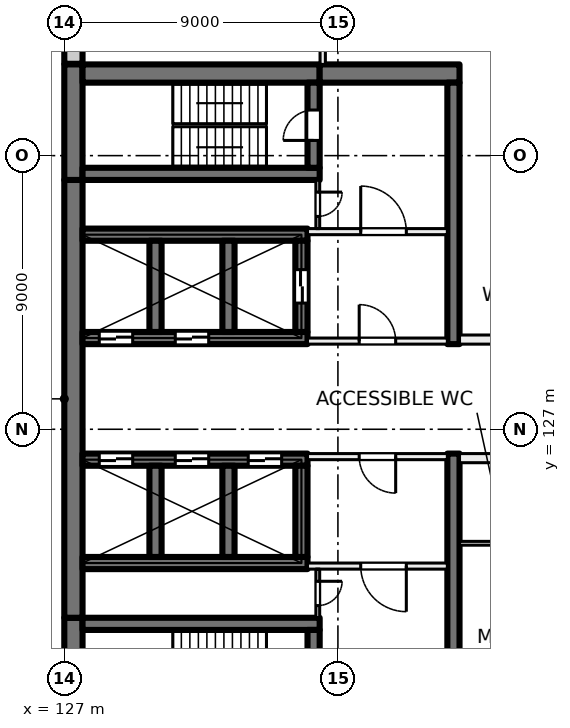
"""IFC4 building model, lengths in metres.
Left out: names, types, materials, properties, quantities, classifications, styles, units other than length and angle.
Written with IfcOpenShell. Run it as: python <this file> out.ifc"""

import sys

from ifc_helpers import new_model, si_unit, direction, frame, frame_2d, origin, place, context, subcontext, project, spatial, rectangle, extrude, element, fill, save


model = new_model("IFC4")
c1 = context("Model", 3, precision=1e-05, world=origin(), true_north=direction((0.0, 1.0)))
c2 = subcontext(c1, "Body", "Model", "MODEL_VIEW")
j1 = project(units=[si_unit("LENGTHUNIT", "METRE"), si_unit("PLANEANGLEUNIT", "RADIAN")], contexts=[c1])
p1 = place(None, origin())
s1 = spatial("IfcSite", under=j1, at=p1, CompositionType="ELEMENT")
p2 = place(p1, origin())
s2 = spatial("IfcBuilding", under=s1, at=p2, CompositionType="ELEMENT")
p3 = place(p2, frame((0.0, 0.0, 51.5)))
s3 = spatial("IfcBuildingStorey", under=s2, at=p3, CompositionType="ELEMENT", Elevation=51.5)
p4 = place(p3, frame((127.3, 117.0, 0.0), z_axis=(0.0, 0.0, 1.0), x_axis=(0.0, 1.0, 0.0)))
e1 = element("IfcWall", 1, at=p4, inside=s3, PredefinedType="SHEAR", context=c2, shape_type="SweptSolid", body=[
    extrude(rectangle(XDim=3.8, YDim=0.6, at=frame_2d((1.9, 0.0))), origin(), (0.0, 0.0, 1.0), 4.0),
])
p5 = place(p3, frame((127.3, 120.8, 0.0), z_axis=(0.0, 0.0, 1.0), x_axis=(0.0, 1.0, 0.0)))
e2 = element("IfcWall", 2, at=p5, inside=s3, PredefinedType="SHEAR", context=c2, shape_type="SweptSolid", body=[
    extrude(rectangle(XDim=14.4, YDim=0.6, at=frame_2d((7.2, 0.0))), origin(), (0.0, 0.0, 1.0), 4.0),
])
p6 = place(p3, frame((127.3, 135.2, 0.0), z_axis=(0.0, 0.0, 1.0), x_axis=(0.0, 1.0, 0.0)))
e3 = element("IfcWall", 3, at=p6, inside=s3, PredefinedType="SHEAR", context=c2, shape_type="SweptSolid", body=[
    extrude(rectangle(XDim=3.8, YDim=0.6, at=frame_2d((1.9, 0.0))), origin(), (0.0, 0.0, 1.0), 4.0),
])
p7 = place(p3, frame((127.6, 138.7, 0.0), z_axis=(0.0, 0.0, 1.0), x_axis=(1.0, 0.0, 0.0)))
e4 = element("IfcWall", 4, at=p7, inside=s3, PredefinedType="SHEAR", context=c2, shape_type="SweptSolid", body=[
    extrude(rectangle(XDim=7.8, YDim=0.6, at=frame_2d((3.9, 0.0))), origin(), (0.0, 0.0, 1.0), 4.0),
])
p8 = place(p3, frame((135.4, 138.7, 0.0), z_axis=(0.0, 0.0, 1.0), x_axis=(1.0, 0.0, 0.0)))
e5 = element("IfcWall", 5, at=p8, inside=s3, PredefinedType="SHEAR", context=c2, shape_type="SweptSolid", body=[
    extrude(rectangle(XDim=4.6, YDim=0.6, at=frame_2d((2.3, 0.0))), origin(), (0.0, 0.0, 1.0), 4.0),
])
p9 = place(p3, frame((127.6, 120.6, 0.0), z_axis=(0.0, 0.0, 1.0), x_axis=(1.0, 0.0, 0.0)))
e6 = element("IfcWall", 6, at=p9, inside=s3, PredefinedType="SHEAR", context=c2, shape_type="SweptSolid", body=[
    extrude(rectangle(XDim=7.8, YDim=0.4, at=frame_2d((3.9, 0.0))), origin(), (0.0, 0.0, 1.0), 4.0),
])
p10 = place(p3, frame((135.2, 117.6, 0.0), z_axis=(0.0, 0.0, 1.0), x_axis=(0.0, 1.0, 0.0)))
e7 = element("IfcWall", 7, at=p10, inside=s3, PredefinedType="SHEAR", context=c2, shape_type="SweptSolid", body=[
    extrude(rectangle(XDim=2.8, YDim=0.4, at=frame_2d((1.4, 0.0))), origin(), (0.0, 0.0, 1.0), 4.0),
])
p11 = place(p10, frame((0.9, 0.0, 0.0)))
e8 = element("IfcOpeningElement", 8, at=p11, cuts=e7, PredefinedType="OPENING", context=c2, shape_type="SweptSolid", body=[
    extrude(rectangle(XDim=1.0, YDim=2.1, at=frame_2d((0.5, 1.05))), frame((0.0, 0.21, 0.0), z_axis=(0.0, -1.0, 0.0), x_axis=(1.0, 0.0, 0.0)), (0.0, 0.0, 1.0), 0.42),
])
p12 = place(p3, frame((127.6, 135.4, 0.0), z_axis=(0.0, 0.0, 1.0), x_axis=(1.0, 0.0, 0.0)))
e9 = element("IfcWall", 9, at=p12, inside=s3, PredefinedType="SHEAR", context=c2, shape_type="SweptSolid", body=[
    extrude(rectangle(XDim=7.8, YDim=0.4, at=frame_2d((3.9, 0.0))), origin(), (0.0, 0.0, 1.0), 4.0),
])
p13 = place(p3, frame((135.2, 135.6, 0.0), z_axis=(0.0, 0.0, 1.0), x_axis=(0.0, 1.0, 0.0)))
e10 = element("IfcWall", 10, at=p13, inside=s3, PredefinedType="SHEAR", context=c2, shape_type="SweptSolid", body=[
    extrude(rectangle(XDim=2.8, YDim=0.4, at=frame_2d((1.4, 0.0))), origin(), (0.0, 0.0, 1.0), 4.0),
])
p14 = place(p13, frame((0.9, 0.0, 0.0)))
e11 = element("IfcOpeningElement", 11, at=p14, cuts=e10, PredefinedType="OPENING", context=c2, shape_type="SweptSolid", body=[
    extrude(rectangle(XDim=1.0, YDim=2.1, at=frame_2d((0.5, 1.05))), frame((0.0, 0.21, 0.0), z_axis=(0.0, -1.0, 0.0), x_axis=(1.0, 0.0, 0.0)), (0.0, 0.0, 1.0), 0.42),
])
p15 = place(p3, frame((127.6, 126.0, 0.0), z_axis=(0.0, 0.0, 1.0), x_axis=(1.0, 0.0, 0.0)))
e12 = element("IfcWall", 12, at=p15, inside=s3, PredefinedType="SHEAR", context=c2, shape_type="SweptSolid", body=[
    extrude(rectangle(XDim=7.4, YDim=0.4, at=frame_2d((3.7, 0.0))), origin(), (0.0, 0.0, 1.0), 4.0),
])
p16 = place(p15, frame((0.55, 0.0, 0.0)))
e13 = element("IfcOpeningElement", 13, at=p16, cuts=e12, PredefinedType="OPENING", context=c2, shape_type="SweptSolid", body=[
    extrude(rectangle(XDim=1.1, YDim=2.1, at=frame_2d((0.55, 1.05))), frame((0.0, 0.21, 0.0), z_axis=(0.0, -1.0, 0.0), x_axis=(1.0, 0.0, 0.0)), (0.0, 0.0, 1.0), 0.42),
])
p17 = place(p15, frame((3.05, 0.0, 0.0)))
e14 = element("IfcOpeningElement", 14, at=p17, cuts=e12, PredefinedType="OPENING", context=c2, shape_type="SweptSolid", body=[
    extrude(rectangle(XDim=1.1, YDim=2.1, at=frame_2d((0.55, 1.05))), frame((0.0, 0.21, 0.0), z_axis=(0.0, -1.0, 0.0), x_axis=(1.0, 0.0, 0.0)), (0.0, 0.0, 1.0), 0.42),
])
p18 = place(p15, frame((5.45, 0.0, 0.0)))
e15 = element("IfcOpeningElement", 15, at=p18, cuts=e12, PredefinedType="OPENING", context=c2, shape_type="SweptSolid", body=[
    extrude(rectangle(XDim=1.1, YDim=2.1, at=frame_2d((0.55, 1.05))), frame((0.0, 0.21, 0.0), z_axis=(0.0, -1.0, 0.0), x_axis=(1.0, 0.0, 0.0)), (0.0, 0.0, 1.0), 0.42),
])
p19 = place(p3, frame((127.6, 122.6, 0.0), z_axis=(0.0, 0.0, 1.0), x_axis=(1.0, 0.0, 0.0)))
e16 = element("IfcWall", 16, at=p19, inside=s3, PredefinedType="SHEAR", context=c2, shape_type="SweptSolid", body=[
    extrude(rectangle(XDim=7.4, YDim=0.4, at=frame_2d((3.7, 0.0))), origin(), (0.0, 0.0, 1.0), 4.0),
])
for number, where, z_axis, x_axis in (
    (17, (130.0, 122.8, 0.0), (0.0, 0.0, 1.0), (0.0, 1.0, 0.0)),
    (18, (132.4, 122.8, 0.0), (0.0, 0.0, 1.0), (0.0, 1.0, 0.0)),
    (19, (134.8, 122.8, 0.0), (0.0, 0.0, 1.0), (0.0, 1.0, 0.0)),
):
    element("IfcWall", number, at=place(p3, frame(where, z_axis=z_axis, x_axis=x_axis)), inside=s3, PredefinedType="SHEAR", context=c2, shape_type="SweptSolid", body=[
        extrude(rectangle(XDim=3.0, YDim=0.4, at=frame_2d((1.5, 0.0))), origin(), (0.0, 0.0, 1.0), 4.0),
    ])
p20 = place(p3, frame((127.6, 130.0, 0.0), z_axis=(0.0, 0.0, 1.0), x_axis=(1.0, 0.0, 0.0)))
e20 = element("IfcWall", 20, at=p20, inside=s3, PredefinedType="SHEAR", context=c2, shape_type="SweptSolid", body=[
    extrude(rectangle(XDim=7.4, YDim=0.4, at=frame_2d((3.7, 0.0))), origin(), (0.0, 0.0, 1.0), 4.0),
])
p21 = place(p20, frame((0.55, 0.0, 0.0)))
e21 = element("IfcOpeningElement", 21, at=p21, cuts=e20, PredefinedType="OPENING", context=c2, shape_type="SweptSolid", body=[
    extrude(rectangle(XDim=1.1, YDim=2.1, at=frame_2d((0.55, 1.05))), frame((0.0, 0.21, 0.0), z_axis=(0.0, -1.0, 0.0), x_axis=(1.0, 0.0, 0.0)), (0.0, 0.0, 1.0), 0.42),
])
p22 = place(p20, frame((3.05, 0.0, 0.0)))
e22 = element("IfcOpeningElement", 22, at=p22, cuts=e20, PredefinedType="OPENING", context=c2, shape_type="SweptSolid", body=[
    extrude(rectangle(XDim=1.1, YDim=2.1, at=frame_2d((0.55, 1.05))), frame((0.0, 0.21, 0.0), z_axis=(0.0, -1.0, 0.0), x_axis=(1.0, 0.0, 0.0)), (0.0, 0.0, 1.0), 0.42),
])
p23 = place(p3, frame((127.6, 133.4, 0.0), z_axis=(0.0, 0.0, 1.0), x_axis=(1.0, 0.0, 0.0)))
e23 = element("IfcWall", 23, at=p23, inside=s3, PredefinedType="SHEAR", context=c2, shape_type="SweptSolid", body=[
    extrude(rectangle(XDim=7.4, YDim=0.4, at=frame_2d((3.7, 0.0))), origin(), (0.0, 0.0, 1.0), 4.0),
])
for number, where, z_axis, x_axis in (
    (24, (130.0, 130.2, 0.0), (0.0, 0.0, 1.0), (0.0, 1.0, 0.0)),
    (25, (132.4, 130.2, 0.0), (0.0, 0.0, 1.0), (0.0, 1.0, 0.0)),
):
    element("IfcWall", number, at=place(p3, frame(where, z_axis=z_axis, x_axis=x_axis)), inside=s3, PredefinedType="SHEAR", context=c2, shape_type="SweptSolid", body=[
        extrude(rectangle(XDim=3.0, YDim=0.4, at=frame_2d((1.5, 0.0))), origin(), (0.0, 0.0, 1.0), 4.0),
    ])
p24 = place(p3, frame((134.8, 130.2, 0.0), z_axis=(0.0, 0.0, 1.0), x_axis=(0.0, 1.0, 0.0)))
e26 = element("IfcWall", 26, at=p24, inside=s3, PredefinedType="SHEAR", context=c2, shape_type="SweptSolid", body=[
    extrude(rectangle(XDim=3.0, YDim=0.4, at=frame_2d((1.5, 0.0))), origin(), (0.0, 0.0, 1.0), 4.0),
])
p25 = place(p24, frame((0.95, 0.0, 0.0)))
e27 = element("IfcOpeningElement", 27, at=p25, cuts=e26, PredefinedType="OPENING", context=c2, shape_type="SweptSolid", body=[
    extrude(rectangle(XDim=1.1, YDim=2.1, at=frame_2d((0.55, 1.05))), frame((0.0, 0.21, 0.0), z_axis=(0.0, -1.0, 0.0), x_axis=(1.0, 0.0, 0.0)), (0.0, 0.0, 1.0), 0.42),
])
for number, where, z_axis, x_axis in (
    (28, (139.8, 117.6, 0.0), (0.0, 0.0, 1.0), (0.0, 1.0, 0.0)),
    (29, (139.8, 129.8, 0.0), (0.0, 0.0, 1.0), (0.0, 1.0, 0.0)),
):
    element("IfcWall", number, at=place(p3, frame(where, z_axis=z_axis, x_axis=x_axis)), inside=s3, PredefinedType="SHEAR", context=c2, shape_type="SweptSolid", body=[
        extrude(rectangle(XDim=8.6, YDim=0.4, at=frame_2d((4.3, 0.0))), origin(), (0.0, 0.0, 1.0), 4.0),
    ])
p26 = place(p3, frame((127.3, 139.02, 0.0), z_axis=(0.0, 0.0, 1.0), x_axis=(0.0, 1.0, 0.0)))
e30 = element("IfcWall", 30, at=p26, inside=s3, PredefinedType="SOLIDWALL", context=c2, shape_type="SweptSolid", body=[
    extrude(rectangle(XDim=2.98, YDim=0.6, at=frame_2d((1.49, 0.0))), origin(), (0.0, 0.0, 1.0), 3.625),
])
p27 = place(p3, frame((135.0, 129.9, 0.0), z_axis=(0.0, 0.0, 1.0), x_axis=(1.0, 0.0, 0.0)))
e31 = element("IfcWall", 31, at=p27, inside=s3, PredefinedType="PARTITIONING", context=c2, shape_type="SweptSolid", body=[
    extrude(rectangle(XDim=4.6, YDim=0.2, at=frame_2d((2.3, 0.0))), origin(), (0.0, 0.0, 1.0), 3.625),
])
p28 = place(p27, frame((1.7, 0.0, 0.0)))
e32 = element("IfcOpeningElement", 32, at=p28, cuts=e31, PredefinedType="OPENING", context=c2, shape_type="SweptSolid", body=[
    extrude(rectangle(XDim=1.2, YDim=2.1, at=frame_2d((0.6, 1.05))), frame((0.0, 0.11, 0.0), z_axis=(0.0, -1.0, 0.0), x_axis=(1.0, 0.0, 0.0)), (0.0, 0.0, 1.0), 0.22),
])
p29 = place(p3, frame((135.0, 133.5, 0.0), z_axis=(0.0, 0.0, 1.0), x_axis=(1.0, 0.0, 0.0)))
e33 = element("IfcWall", 33, at=p29, inside=s3, PredefinedType="PARTITIONING", context=c2, shape_type="SweptSolid", body=[
    extrude(rectangle(XDim=4.6, YDim=0.2, at=frame_2d((2.3, 0.0))), origin(), (0.0, 0.0, 1.0), 3.625),
])
p30 = place(p29, frame((1.75, 0.0, 0.0)))
e34 = element("IfcOpeningElement", 34, at=p30, cuts=e33, PredefinedType="OPENING", context=c2, shape_type="SweptSolid", body=[
    extrude(rectangle(XDim=1.5, YDim=2.1, at=frame_2d((0.75, 1.05))), frame((0.0, 0.11, 0.0), z_axis=(0.0, -1.0, 0.0), x_axis=(1.0, 0.0, 0.0)), (0.0, 0.0, 1.0), 0.22),
])
p31 = place(p3, frame((135.337, 135.2, 0.0), z_axis=(0.0, 0.0, 1.0), x_axis=(0.0, -1.0, 0.0)))
e35 = element("IfcWall", 35, at=p31, inside=s3, PredefinedType="PARTITIONING", context=c2, shape_type="SweptSolid", body=[
    extrude(rectangle(XDim=1.6, YDim=0.125, at=frame_2d((0.8, 0.0))), origin(), (0.0, 0.0, 1.0), 3.625),
])
p32 = place(p31, frame((0.4, 0.0, 0.0)))
e36 = element("IfcOpeningElement", 36, at=p32, cuts=e35, PredefinedType="OPENING", context=c2, shape_type="SweptSolid", body=[
    extrude(rectangle(XDim=0.8, YDim=2.1, at=frame_2d((0.4, 1.05))), frame((0.0, 0.073, 0.0), z_axis=(0.0, -1.0, 0.0), x_axis=(1.0, 0.0, 0.0)), (0.0, 0.0, 1.0), 0.145),
])
p33 = place(p3, frame((139.6, 126.1, 0.0), z_axis=(0.0, 0.0, 1.0), x_axis=(-1.0, 0.0, 0.0)))
e37 = element("IfcWall", 37, at=p33, inside=s3, PredefinedType="PARTITIONING", context=c2, shape_type="SweptSolid", body=[
    extrude(rectangle(XDim=4.6, YDim=0.2, at=frame_2d((2.3, 0.0))), origin(), (0.0, 0.0, 1.0), 3.625),
])
p34 = place(p33, frame((1.7, 0.0, 0.0)))
e38 = element("IfcOpeningElement", 38, at=p34, cuts=e37, PredefinedType="OPENING", context=c2, shape_type="SweptSolid", body=[
    extrude(rectangle(XDim=1.2, YDim=2.1, at=frame_2d((0.6, 1.05))), frame((0.0, 0.11, 0.0), z_axis=(0.0, -1.0, 0.0), x_axis=(1.0, 0.0, 0.0)), (0.0, 0.0, 1.0), 0.22),
])
p35 = place(p3, frame((139.6, 122.5, 0.0), z_axis=(0.0, 0.0, 1.0), x_axis=(-1.0, 0.0, 0.0)))
e39 = element("IfcWall", 39, at=p35, inside=s3, PredefinedType="PARTITIONING", context=c2, shape_type="SweptSolid", body=[
    extrude(rectangle(XDim=4.6, YDim=0.2, at=frame_2d((2.3, 0.0))), origin(), (0.0, 0.0, 1.0), 3.625),
])
p36 = place(p35, frame((1.35, 0.0, 0.0)))
e40 = element("IfcOpeningElement", 40, at=p36, cuts=e39, PredefinedType="OPENING", context=c2, shape_type="SweptSolid", body=[
    extrude(rectangle(XDim=1.5, YDim=2.1, at=frame_2d((0.75, 1.05))), frame((0.0, 0.11, 0.0), z_axis=(0.0, -1.0, 0.0), x_axis=(1.0, 0.0, 0.0)), (0.0, 0.0, 1.0), 0.22),
])
p37 = place(p3, frame((135.337, 122.4, 0.0), z_axis=(0.0, 0.0, 1.0), x_axis=(0.0, -1.0, 0.0)))
e41 = element("IfcWall", 41, at=p37, inside=s3, PredefinedType="PARTITIONING", context=c2, shape_type="SweptSolid", body=[
    extrude(rectangle(XDim=1.6, YDim=0.125, at=frame_2d((0.8, 0.0))), origin(), (0.0, 0.0, 1.0), 3.625),
])
p38 = place(p37, frame((0.4, 0.0, 0.0)))
e42 = element("IfcOpeningElement", 42, at=p38, cuts=e41, PredefinedType="OPENING", context=c2, shape_type="SweptSolid", body=[
    extrude(rectangle(XDim=0.8, YDim=2.1, at=frame_2d((0.4, 1.05))), frame((0.0, 0.073, 0.0), z_axis=(0.0, -1.0, 0.0), x_axis=(1.0, 0.0, 0.0)), (0.0, 0.0, 1.0), 0.145),
])
p39 = place(p3, frame((135.5, 145.4, 0.0), z_axis=(0.0, 0.0, 1.0), x_axis=(0.0, -1.0, 0.0)))
e43 = element("IfcWall", 43, at=p39, inside=s3, PredefinedType="PARTITIONING", context=c2, shape_type="SweptSolid", body=[
    extrude(rectangle(XDim=6.4, YDim=0.175, at=frame_2d((3.2, 0.0))), origin(), (0.0, 0.0, 1.0), 3.625),
])
p40 = place(p39, frame((2.6, 0.0, 0.0)))
e44 = element("IfcOpeningElement", 44, at=p40, cuts=e43, PredefinedType="OPENING", context=c2, shape_type="SweptSolid", body=[
    extrude(rectangle(XDim=1.2, YDim=2.1, at=frame_2d((0.6, 1.05))), frame((0.0, 0.097, 0.0), z_axis=(0.0, -1.0, 0.0), x_axis=(1.0, 0.0, 0.0)), (0.0, 0.0, 1.0), 0.195),
])
p41 = place(p3, frame((148.938, 123.25, 0.0), z_axis=(0.0, 0.0, 1.0), x_axis=(-1.0, 0.0, 0.0)))
e45 = element("IfcWall", 45, at=p41, inside=s3, PredefinedType="PARTITIONING", context=c2, shape_type="SweptSolid", body=[
    extrude(rectangle(XDim=8.938, YDim=0.125, at=frame_2d((4.469, 0.0))), origin(), (0.0, 0.0, 1.0), 3.625),
])
p42 = place(p41, frame((1.809, 0.0, 0.0)))
e46 = element("IfcOpeningElement", 46, at=p42, cuts=e45, PredefinedType="OPENING", context=c2, shape_type="SweptSolid", body=[
    extrude(rectangle(XDim=0.8, YDim=2.1, at=frame_2d((0.4, 1.05))), frame((0.0, 0.073, 0.0), z_axis=(0.0, -1.0, 0.0), x_axis=(1.0, 0.0, 0.0)), (0.0, 0.0, 1.0), 0.145),
])
p43 = place(p41, frame((5.04, 0.0, 0.0)))
e47 = element("IfcOpeningElement", 47, at=p43, cuts=e45, PredefinedType="OPENING", context=c2, shape_type="SweptSolid", body=[
    extrude(rectangle(XDim=0.8, YDim=2.1, at=frame_2d((0.4, 1.05))), frame((0.0, 0.073, 0.0), z_axis=(0.0, -1.0, 0.0), x_axis=(1.0, 0.0, 0.0)), (0.0, 0.0, 1.0), 0.145),
])
p44 = place(p3, frame((140.0, 129.95, 0.0), z_axis=(0.0, 0.0, 1.0), x_axis=(1.0, 0.0, 0.0)))
e48 = element("IfcWall", 48, at=p44, inside=s3, PredefinedType="PARTITIONING", context=c2, shape_type="SweptSolid", body=[
    extrude(rectangle(XDim=14.0, YDim=0.3, at=frame_2d((7.0, 0.0))), origin(), (0.0, 0.0, 1.0), 3.625),
])
p45 = place(p44, frame((6.1, 0.0, 0.0)))
e49 = element("IfcOpeningElement", 49, at=p45, cuts=e48, PredefinedType="OPENING", context=c2, shape_type="SweptSolid", body=[
    extrude(rectangle(XDim=1.8, YDim=2.1, at=frame_2d((0.9, 1.05))), frame((0.0, 0.16, 0.0), z_axis=(0.0, -1.0, 0.0), x_axis=(1.0, 0.0, 0.0)), (0.0, 0.0, 1.0), 0.32),
])
p46 = place(p3, frame((154.0, 126.05, 0.0), z_axis=(0.0, 0.0, 1.0), x_axis=(-1.0, 0.0, 0.0)))
e50 = element("IfcWall", 50, at=p46, inside=s3, PredefinedType="PARTITIONING", context=c2, shape_type="SweptSolid", body=[
    extrude(rectangle(XDim=14.0, YDim=0.3, at=frame_2d((7.0, 0.0))), origin(), (0.0, 0.0, 1.0), 3.625),
])
p47 = place(p46, frame((7.75, 0.0, 0.0)))
e51 = element("IfcOpeningElement", 51, at=p47, cuts=e50, PredefinedType="OPENING", context=c2, shape_type="SweptSolid", body=[
    extrude(rectangle(XDim=1.0, YDim=2.1, at=frame_2d((0.5, 1.05))), frame((0.0, 0.16, 0.0), z_axis=(0.0, -1.0, 0.0), x_axis=(1.0, 0.0, 0.0)), (0.0, 0.0, 1.0), 0.32),
])
p48 = place(p46, frame((1.6, 0.0, 0.0)))
e52 = element("IfcOpeningElement", 52, at=p48, cuts=e50, PredefinedType="OPENING", context=c2, shape_type="SweptSolid", body=[
    extrude(rectangle(XDim=1.8, YDim=2.1, at=frame_2d((0.9, 1.05))), frame((0.0, 0.16, 0.0), z_axis=(0.0, -1.0, 0.0), x_axis=(1.0, 0.0, 0.0)), (0.0, 0.0, 1.0), 0.32),
])
p49 = place(p21, origin())
e53 = element("IfcDoor", 53, at=p49, inside=s3, OperationType="DOUBLE_DOOR_SLIDING", PredefinedType="DOOR", context=c2, shape_type="SweptSolid", body=[
    extrude(rectangle(XDim=1.1, YDim=2.1, at=frame_2d((0.55, 1.05))), frame((0.0, 0.025, 0.0), z_axis=(0.0, -1.0, 0.0), x_axis=(1.0, 0.0, 0.0)), (0.0, 0.0, 1.0), 0.05),
])
fill(e21, e53)
p50 = place(p22, origin())
e54 = element("IfcDoor", 54, at=p50, inside=s3, OperationType="DOUBLE_DOOR_SLIDING", PredefinedType="DOOR", context=c2, shape_type="SweptSolid", body=[
    extrude(rectangle(XDim=1.1, YDim=2.1, at=frame_2d((0.55, 1.05))), frame((0.0, 0.025, 0.0), z_axis=(0.0, -1.0, 0.0), x_axis=(1.0, 0.0, 0.0)), (0.0, 0.0, 1.0), 0.05),
])
fill(e22, e54)
p51 = place(p16, origin())
e55 = element("IfcDoor", 55, at=p51, inside=s3, OperationType="DOUBLE_DOOR_SLIDING", PredefinedType="DOOR", context=c2, shape_type="SweptSolid", body=[
    extrude(rectangle(XDim=1.1, YDim=2.1, at=frame_2d((0.55, 1.05))), frame((0.0, 0.025, 0.0), z_axis=(0.0, -1.0, 0.0), x_axis=(1.0, 0.0, 0.0)), (0.0, 0.0, 1.0), 0.05),
])
fill(e13, e55)
p52 = place(p17, origin())
e56 = element("IfcDoor", 56, at=p52, inside=s3, OperationType="DOUBLE_DOOR_SLIDING", PredefinedType="DOOR", context=c2, shape_type="SweptSolid", body=[
    extrude(rectangle(XDim=1.1, YDim=2.1, at=frame_2d((0.55, 1.05))), frame((0.0, 0.025, 0.0), z_axis=(0.0, -1.0, 0.0), x_axis=(1.0, 0.0, 0.0)), (0.0, 0.0, 1.0), 0.05),
])
fill(e14, e56)
p53 = place(p18, origin())
e57 = element("IfcDoor", 57, at=p53, inside=s3, OperationType="DOUBLE_DOOR_SLIDING", PredefinedType="DOOR", context=c2, shape_type="SweptSolid", body=[
    extrude(rectangle(XDim=1.1, YDim=2.1, at=frame_2d((0.55, 1.05))), frame((0.0, 0.025, 0.0), z_axis=(0.0, -1.0, 0.0), x_axis=(1.0, 0.0, 0.0)), (0.0, 0.0, 1.0), 0.05),
])
fill(e15, e57)
p54 = place(p28, origin())
e58 = element("IfcDoor", 58, at=p54, inside=s3, OperationType="DOUBLE_DOOR_SINGLE_SWING", PredefinedType="DOOR", context=c2, shape_type="SweptSolid", body=[
    extrude(rectangle(XDim=1.2, YDim=2.1, at=frame_2d((0.6, 1.05))), frame((0.0, 0.025, 0.0), z_axis=(0.0, -1.0, 0.0), x_axis=(1.0, 0.0, 0.0)), (0.0, 0.0, 1.0), 0.05),
])
fill(e32, e58)
p55 = place(p30, origin())
e59 = element("IfcDoor", 59, at=p55, inside=s3, OperationType="DOUBLE_DOOR_SINGLE_SWING", PredefinedType="DOOR", context=c2, shape_type="SweptSolid", body=[
    extrude(rectangle(XDim=1.5, YDim=2.1, at=frame_2d((0.75, 1.05))), frame((0.0, 0.025, 0.0), z_axis=(0.0, -1.0, 0.0), x_axis=(1.0, 0.0, 0.0)), (0.0, 0.0, 1.0), 0.05),
])
fill(e34, e59)
p56 = place(p14, origin())
e60 = element("IfcDoor", 60, at=p56, inside=s3, OperationType="SINGLE_SWING_LEFT", PredefinedType="DOOR", context=c2, shape_type="SweptSolid", body=[
    extrude(rectangle(XDim=1.0, YDim=2.1, at=frame_2d((0.5, 1.05))), frame((0.0, 0.025, 0.0), z_axis=(0.0, -1.0, 0.0), x_axis=(1.0, 0.0, 0.0)), (0.0, 0.0, 1.0), 0.05),
])
fill(e11, e60)
p57 = place(p32, origin())
e61 = element("IfcDoor", 61, at=p57, inside=s3, OperationType="SINGLE_SWING_RIGHT", PredefinedType="DOOR", context=c2, shape_type="SweptSolid", body=[
    extrude(rectangle(XDim=0.8, YDim=2.1, at=frame_2d((0.4, 1.05))), frame((0.0, 0.025, 0.0), z_axis=(0.0, -1.0, 0.0), x_axis=(1.0, 0.0, 0.0)), (0.0, 0.0, 1.0), 0.05),
])
fill(e36, e61)
p58 = place(p34, origin())
e62 = element("IfcDoor", 62, at=p58, inside=s3, OperationType="DOUBLE_DOOR_SINGLE_SWING", PredefinedType="DOOR", context=c2, shape_type="SweptSolid", body=[
    extrude(rectangle(XDim=1.2, YDim=2.1, at=frame_2d((0.6, 1.05))), frame((0.0, 0.025, 0.0), z_axis=(0.0, -1.0, 0.0), x_axis=(1.0, 0.0, 0.0)), (0.0, 0.0, 1.0), 0.05),
])
fill(e38, e62)
p59 = place(p36, origin())
e63 = element("IfcDoor", 63, at=p59, inside=s3, OperationType="DOUBLE_DOOR_SINGLE_SWING", PredefinedType="DOOR", context=c2, shape_type="SweptSolid", body=[
    extrude(rectangle(XDim=1.5, YDim=2.1, at=frame_2d((0.75, 1.05))), frame((0.0, 0.025, 0.0), z_axis=(0.0, -1.0, 0.0), x_axis=(1.0, 0.0, 0.0)), (0.0, 0.0, 1.0), 0.05),
])
fill(e40, e63)
p60 = place(p38, origin())
e64 = element("IfcDoor", 64, at=p60, inside=s3, OperationType="SINGLE_SWING_LEFT", PredefinedType="DOOR", context=c2, shape_type="SweptSolid", body=[
    extrude(rectangle(XDim=0.8, YDim=2.1, at=frame_2d((0.4, 1.05))), frame((0.0, 0.025, 0.0), z_axis=(0.0, -1.0, 0.0), x_axis=(1.0, 0.0, 0.0)), (0.0, 0.0, 1.0), 0.05),
])
fill(e42, e64)
p61 = place(p25, origin())
e65 = element("IfcDoor", 65, at=p61, inside=s3, OperationType="DOUBLE_DOOR_SLIDING", PredefinedType="DOOR", context=c2, shape_type="SweptSolid", body=[
    extrude(rectangle(XDim=1.1, YDim=2.1, at=frame_2d((0.55, 1.05))), frame((0.0, 0.025, 0.0), z_axis=(0.0, -1.0, 0.0), x_axis=(1.0, 0.0, 0.0)), (0.0, 0.0, 1.0), 0.05),
])
fill(e27, e65)
save(model, sys.argv[1])
